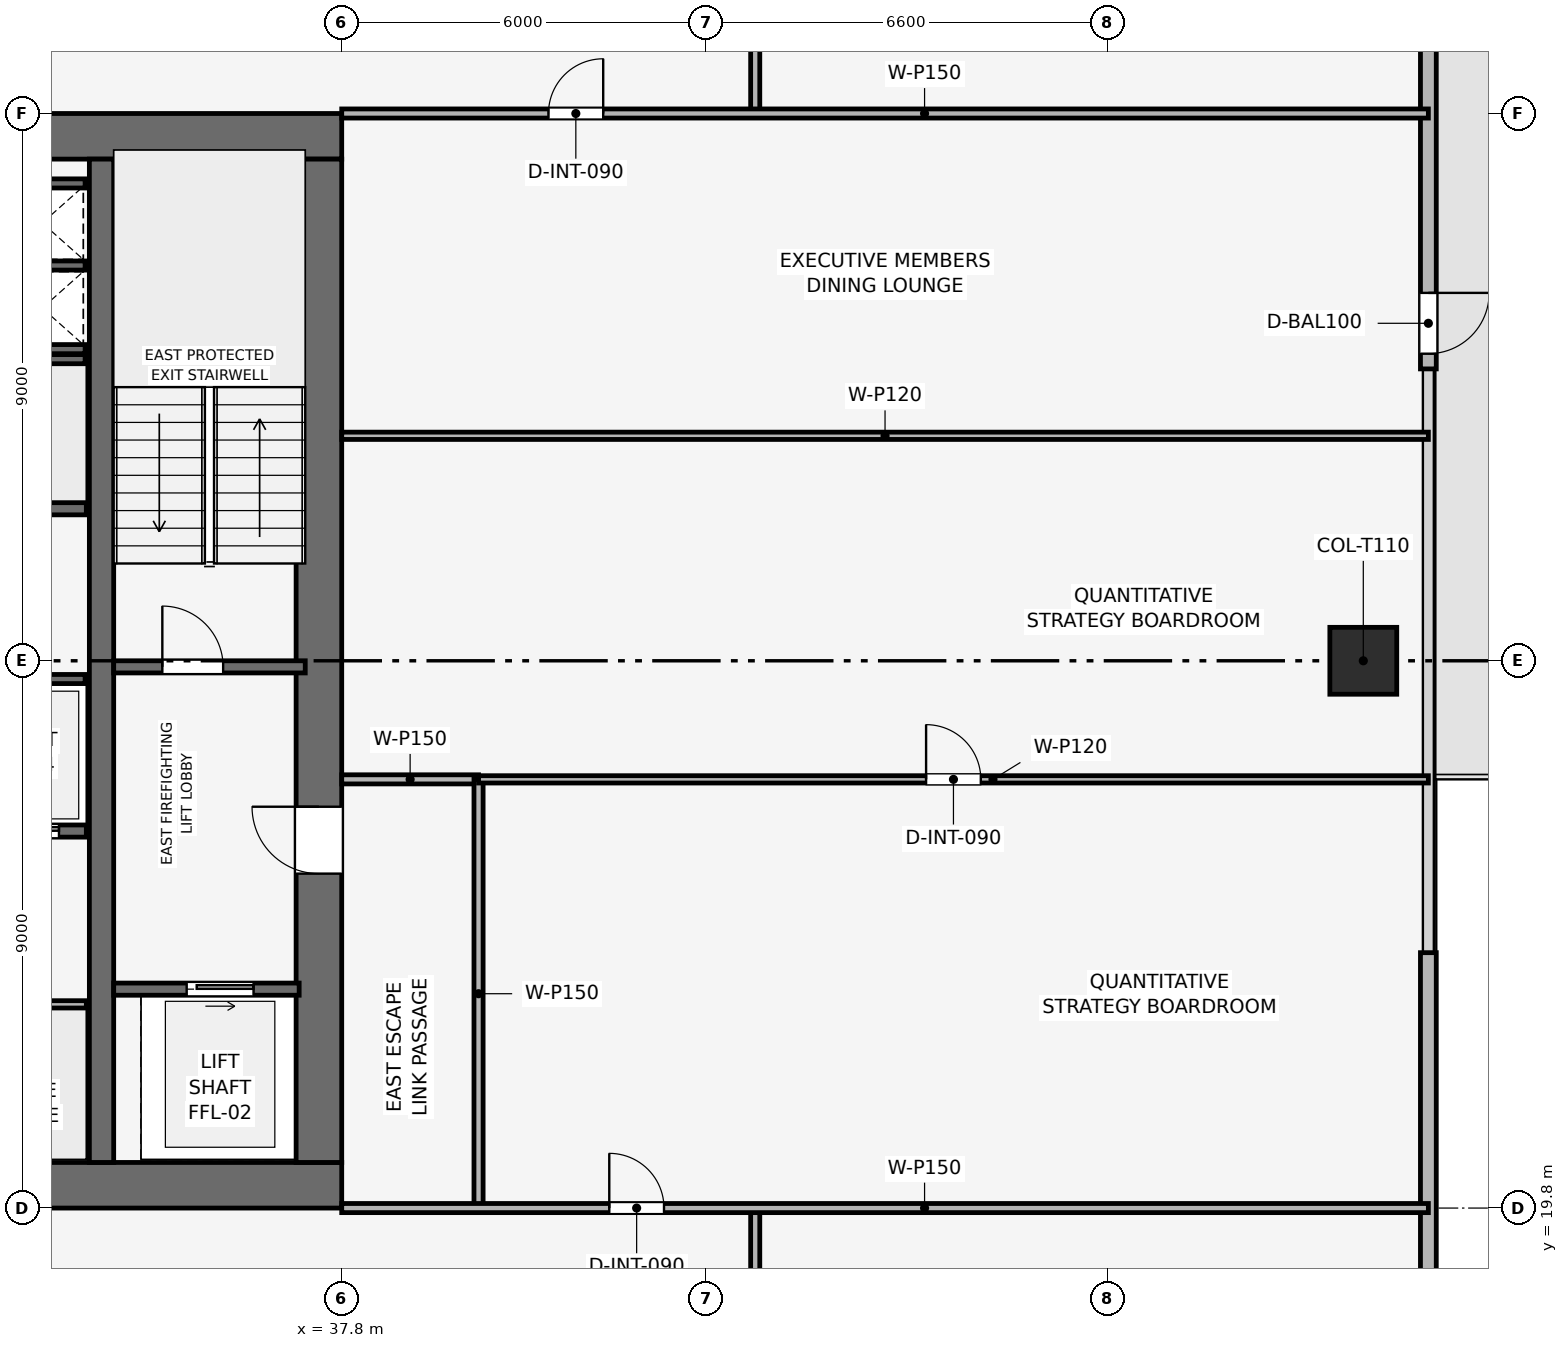
"""IFC4 building model, lengths in metres.
Left out: names, types, materials, properties, quantities, classifications, styles, units other than length and angle.
Written with IfcOpenShell. Run it as: python <this file> out.ifc"""

import sys

from ifc_helpers import new_model, si_unit, direction, frame, frame_2d, origin, origin_2d, place, context, subcontext, project, spatial, rectangle, extrude, element, fill, save


model = new_model("IFC4")
c1 = context("Model", 3, precision=1e-05, world=origin(), true_north=direction((0.0, 1.0)))
c2 = subcontext(c1, "Body", "Model", "MODEL_VIEW")
j1 = project(units=[si_unit("LENGTHUNIT", "METRE"), si_unit("PLANEANGLEUNIT", "RADIAN")], contexts=[c1])
p1 = place(None, origin())
s1 = spatial("IfcSite", under=j1, at=p1, CompositionType="ELEMENT")
p2 = place(p1, origin())
s2 = spatial("IfcBuilding", under=s1, at=p2, CompositionType="ELEMENT")
p3 = place(p2, frame((0.0, 0.0, 237.45)))
s3 = spatial("IfcBuildingStorey", under=s2, at=p3, CompositionType="ELEMENT", Elevation=237.45)
p4 = place(p3, frame((19.8, 20.175, 0.0), z_axis=(0.0, 0.0, 1.0), x_axis=(1.0, 0.0, 0.0)))
e1 = element("IfcWall", 1, at=p4, inside=s3, PredefinedType="SHEAR", context=c2, shape_type="SweptSolid", body=[
    extrude(rectangle(XDim=18.0, YDim=0.75, at=frame_2d((9.0, 0.0))), origin(), (0.0, 0.0, 1.0), 3.75),
])
p5 = place(p4, frame((8.4, 0.0, 0.0)))
e2 = element("IfcOpeningElement", 2, at=p5, cuts=e1, PredefinedType="OPENING", context=c2, shape_type="SweptSolid", body=[
    extrude(rectangle(XDim=1.2, YDim=2.2, at=frame_2d((0.6, 1.1))), frame((0.0, 0.385, 0.0), z_axis=(0.0, -1.0, 0.0), x_axis=(1.0, 0.0, 0.0)), (0.0, 0.0, 1.0), 0.77),
])
p6 = place(p3, frame((19.8, 37.425, 0.0), z_axis=(0.0, 0.0, 1.0), x_axis=(1.0, 0.0, 0.0)))
e3 = element("IfcWall", 3, at=p6, inside=s3, PredefinedType="SHEAR", context=c2, shape_type="SweptSolid", body=[
    extrude(rectangle(XDim=18.0, YDim=0.75, at=frame_2d((9.0, 0.0))), origin(), (0.0, 0.0, 1.0), 3.75),
])
p7 = place(p6, frame((7.05, 0.0, 0.0)))
e4 = element("IfcOpeningElement", 4, at=p7, cuts=e3, PredefinedType="OPENING", context=c2, shape_type="SweptSolid", body=[
    extrude(rectangle(XDim=1.1, YDim=2.15, at=frame_2d((0.55, 1.075))), frame((0.0, 0.385, 0.0), z_axis=(0.0, -1.0, 0.0), x_axis=(1.0, 0.0, 0.0)), (0.0, 0.0, 1.0), 0.77),
])
p8 = place(p3, frame((37.425, 20.55, 0.0), z_axis=(0.0, 0.0, 1.0), x_axis=(0.0, 1.0, 0.0)))
e5 = element("IfcWall", 5, at=p8, inside=s3, PredefinedType="SHEAR", context=c2, shape_type="SweptSolid", body=[
    extrude(rectangle(XDim=16.5, YDim=0.75, at=frame_2d((8.25, 0.0))), origin(), (0.0, 0.0, 1.0), 3.75),
])
p9 = place(p8, frame((4.75, 0.0, 0.0)))
e6 = element("IfcOpeningElement", 6, at=p9, cuts=e5, PredefinedType="OPENING", context=c2, shape_type="SweptSolid", body=[
    extrude(rectangle(XDim=1.1, YDim=2.15, at=frame_2d((0.55, 1.075))), frame((0.0, 0.385, 0.0), z_axis=(0.0, -1.0, 0.0), x_axis=(1.0, 0.0, 0.0)), (0.0, 0.0, 1.0), 0.77),
])
p10 = place(p3, frame((33.85, 20.55, 0.0), z_axis=(0.0, 0.0, 1.0), x_axis=(0.0, 1.0, 0.0)))
e7 = element("IfcWall", 7, at=p10, inside=s3, PredefinedType="SHEAR", context=c2, shape_type="SweptSolid", body=[
    extrude(rectangle(XDim=16.5, YDim=0.4, at=frame_2d((8.25, 0.0))), origin(), (0.0, 0.0, 1.0), 3.75),
])
p11 = place(p3, frame((54.6, 28.8, 0.003), z_axis=(0.0, 0.0, 1.0), x_axis=(1.0, 0.0, 0.0)))
e8 = element("IfcColumn", 8, at=p11, inside=s3, PredefinedType="COLUMN", context=c2, shape_type="SweptSolid", body=[
    extrude(rectangle(XDim=1.1, YDim=1.1, at=origin_2d()), origin(), (0.0, 0.0, 1.0), 3.494),
])
p12 = place(p3, frame((55.67, 48.3, 0.0), z_axis=(0.0, 0.0, 1.0), x_axis=(0.0, -1.0, 0.0)))
e9 = element("IfcWall", 9, at=p12, inside=s3, PredefinedType="SOLIDWALL", context=c2, shape_type="SweptSolid", body=[
    extrude(rectangle(XDim=14.7, YDim=0.26, at=frame_2d((7.35, 0.0))), origin(), (0.0, 0.0, 1.0), 3.5),
])
p13 = place(p12, frame((13.45, 0.0, 0.0)))
e10 = element("IfcOpeningElement", 10, at=p13, cuts=e9, PredefinedType="OPENING", context=c2, shape_type="SweptSolid", body=[
    extrude(rectangle(XDim=1.0, YDim=2.2, at=frame_2d((0.5, 1.1))), frame((0.0, 0.14, 0.0), z_axis=(0.0, -1.0, 0.0), x_axis=(1.0, 0.0, 0.0)), (0.0, 0.0, 1.0), 0.28),
])
p14 = place(p3, frame((55.67, 24.0, 0.0), z_axis=(0.0, 0.0, 1.0), x_axis=(0.0, -1.0, 0.0)))
e11 = element("IfcWall", 11, at=p14, inside=s3, PredefinedType="SOLIDWALL", context=c2, shape_type="SweptSolid", body=[
    extrude(rectangle(XDim=14.7, YDim=0.26, at=frame_2d((7.35, 0.0))), origin(), (0.0, 0.0, 1.0), 3.5),
])
p15 = place(p14, frame((12.65, 0.0, 0.72)))
e12 = element("IfcOpeningElement", 12, at=p15, cuts=e11, PredefinedType="OPENING", context=c2, shape_type="SweptSolid", body=[
    extrude(rectangle(XDim=1.8, YDim=2.1, at=frame_2d((0.9, 1.05))), frame((0.0, 0.14, 0.0), z_axis=(0.0, -1.0, 0.0), x_axis=(1.0, 0.0, 0.0)), (0.0, 0.0, 1.0), 0.28),
])
p16 = place(p3, frame((34.05, 28.7, 0.0), z_axis=(0.0, 0.0, 1.0), x_axis=(1.0, 0.0, 0.0)))
e13 = element("IfcWall", 13, at=p16, inside=s3, PredefinedType="SHEAR", context=c2, shape_type="SweptSolid", body=[
    extrude(rectangle(XDim=3.15, YDim=0.2, at=frame_2d((1.575, 0.0))), origin(), (0.0, 0.0, 1.0), 3.5),
])
p17 = place(p16, frame((0.8, 0.0, 0.0)))
e14 = element("IfcOpeningElement", 14, at=p17, cuts=e13, PredefinedType="OPENING", context=c2, shape_type="SweptSolid", body=[
    extrude(rectangle(XDim=1.0, YDim=2.1, at=frame_2d((0.5, 1.05))), frame((0.0, 0.11, 0.0), z_axis=(0.0, -1.0, 0.0), x_axis=(1.0, 0.0, 0.0)), (0.0, 0.0, 1.0), 0.22),
])
for number, where, z_axis, x_axis in (
    (15, (32.25, 33.925, 0.0), (0.0, 0.0, 1.0), (1.0, 0.0, 0.0)),
    (16, (32.25, 35.3, 0.0), (0.0, 0.0, 1.0), (1.0, 0.0, 0.0)),
):
    element("IfcWall", number, at=place(p3, frame(where, z_axis=z_axis, x_axis=x_axis)), inside=s3, PredefinedType="SHEAR", context=c2, shape_type="SweptSolid", body=[
        extrude(rectangle(XDim=1.33, YDim=0.15, at=frame_2d((0.665, 0.0))), origin(), (0.0, 0.0, 1.0), 3.5),
    ])
p18 = place(p3, frame((34.05, 23.4, 0.0), z_axis=(0.0, 0.0, 1.0), x_axis=(1.0, 0.0, 0.0)))
e17 = element("IfcWall", 17, at=p18, inside=s3, PredefinedType="SHEAR", context=c2, shape_type="SweptSolid", body=[
    extrude(rectangle(XDim=3.05, YDim=0.2, at=frame_2d((1.525, 0.0))), origin(), (0.0, 0.0, 1.0), 3.5),
])
p19 = place(p18, frame((1.2, 0.0, 0.0)))
e18 = element("IfcOpeningElement", 18, at=p19, cuts=e17, PredefinedType="OPENING", context=c2, shape_type="SweptSolid", body=[
    extrude(rectangle(XDim=1.1, YDim=2.15, at=frame_2d((0.55, 1.075))), frame((0.0, 0.11, 0.0), z_axis=(0.0, -1.0, 0.0), x_axis=(1.0, 0.0, 0.0)), (0.0, 0.0, 1.0), 0.22),
])
p20 = place(p3, frame((31.6, 26.0, 0.0), z_axis=(0.0, 0.0, 1.0), x_axis=(1.0, 0.0, 0.0)))
e19 = element("IfcWall", 19, at=p20, inside=s3, PredefinedType="SHEAR", context=c2, shape_type="SweptSolid", body=[
    extrude(rectangle(XDim=2.0, YDim=0.2, at=frame_2d((1.0, 0.0))), origin(), (0.0, 0.0, 1.0), 3.5),
])
p21 = place(p20, frame((0.45, 0.0, 0.0)))
e20 = element("IfcOpeningElement", 20, at=p21, cuts=e19, PredefinedType="OPENING", context=c2, shape_type="SweptSolid", body=[
    extrude(rectangle(XDim=1.1, YDim=2.15, at=frame_2d((0.55, 1.075))), frame((0.0, 0.11, 0.0), z_axis=(0.0, -1.0, 0.0), x_axis=(1.0, 0.0, 0.0)), (0.0, 0.0, 1.0), 0.22),
])
p22 = place(p3, frame((31.6, 31.3, 0.0), z_axis=(0.0, 0.0, 1.0), x_axis=(1.0, 0.0, 0.0)))
e21 = element("IfcWall", 21, at=p22, inside=s3, PredefinedType="SHEAR", context=c2, shape_type="SweptSolid", body=[
    extrude(rectangle(XDim=2.0, YDim=0.2, at=frame_2d((1.0, 0.0))), origin(), (0.0, 0.0, 1.0), 3.5),
])
p23 = place(p3, frame((32.25, 36.65, 0.0), z_axis=(0.0, 0.0, 1.0), x_axis=(1.0, 0.0, 0.0)))
e22 = element("IfcWall", 22, at=p23, inside=s3, PredefinedType="SHEAR", context=c2, shape_type="SweptSolid", body=[
    extrude(rectangle(XDim=1.33, YDim=0.15, at=frame_2d((0.665, 0.0))), origin(), (0.0, 0.0, 1.0), 3.5),
])
for number, where, z_axis, x_axis in (
    (23, (29.5, 28.5, 0.0), (0.0, 0.0, 1.0), (1.0, 0.0, 0.0)),
    (24, (29.5, 33.76, 0.0), (0.0, 0.0, 1.0), (1.0, 0.0, 0.0)),
):
    element("IfcWall", number, at=place(p3, frame(where, z_axis=z_axis, x_axis=x_axis)), inside=s3, PredefinedType="SHEAR", context=c2, shape_type="SweptSolid", body=[
        extrude(rectangle(XDim=4.08, YDim=0.15, at=frame_2d((2.04, 0.0))), origin(), (0.0, 0.0, 1.0), 3.5),
    ])
p24 = place(p3, frame((29.55, 23.15, 0.0), z_axis=(0.0, 0.0, 1.0), x_axis=(1.0, 0.0, 0.0)))
e25 = element("IfcWall", 25, at=p24, inside=s3, PredefinedType="PARTITIONING", context=c2, shape_type="SweptSolid", body=[
    extrude(rectangle(XDim=4.05, YDim=0.12, at=frame_2d((2.025, 0.0))), origin(), (0.0, 0.0, 1.0), 3.5),
])
p25 = place(p24, frame((1.575, 0.0, 0.0)))
e26 = element("IfcOpeningElement", 26, at=p25, cuts=e25, PredefinedType="OPENING", context=c2, shape_type="SweptSolid", body=[
    extrude(rectangle(XDim=0.9, YDim=2.1, at=frame_2d((0.45, 1.05))), frame((0.0, 0.07, 0.0), z_axis=(0.0, -1.0, 0.0), x_axis=(1.0, 0.0, 0.0)), (0.0, 0.0, 1.0), 0.14),
])
p26 = place(p3, frame((37.8, 26.85, 0.0), z_axis=(0.0, 0.0, 1.0), x_axis=(1.0, 0.0, 0.0)))
e27 = element("IfcWall", 27, at=p26, inside=s3, PredefinedType="PARTITIONING", context=c2, shape_type="SweptSolid", body=[
    extrude(rectangle(XDim=2.25, YDim=0.15, at=frame_2d((1.125, 0.0))), origin(), (0.0, 0.0, 1.0), 3.5),
])
p27 = place(p3, frame((40.05, 19.8, 0.0), z_axis=(0.0, 0.0, 1.0), x_axis=(0.0, 1.0, 0.0)))
e28 = element("IfcWall", 28, at=p27, inside=s3, PredefinedType="PARTITIONING", context=c2, shape_type="SweptSolid", body=[
    extrude(rectangle(XDim=7.05, YDim=0.15, at=frame_2d((3.525, 0.0))), origin(), (0.0, 0.0, 1.0), 3.035),
])
p28 = place(p3, frame((40.05, 26.85, 0.0), z_axis=(0.0, 0.0, 1.0), x_axis=(1.0, 0.0, 0.0)))
e29 = element("IfcWall", 29, at=p28, inside=s3, PredefinedType="PARTITIONING", context=c2, shape_type="SweptSolid", body=[
    extrude(rectangle(XDim=15.62, YDim=0.12, at=frame_2d((7.81, 0.0))), origin(), (0.0, 0.0, 1.0), 2.685),
])
p29 = place(p28, frame((7.36, 0.0, 0.0)))
e30 = element("IfcOpeningElement", 30, at=p29, cuts=e29, PredefinedType="OPENING", context=c2, shape_type="SweptSolid", body=[
    extrude(rectangle(XDim=0.9, YDim=2.1, at=frame_2d((0.45, 1.05))), frame((0.0, 0.07, 0.0), z_axis=(0.0, -1.0, 0.0), x_axis=(1.0, 0.0, 0.0)), (0.0, 0.0, 1.0), 0.14),
])
p30 = place(p3, frame((37.8, 32.5, 0.0), z_axis=(0.0, 0.0, 1.0), x_axis=(1.0, 0.0, 0.0)))
e31 = element("IfcWall", 31, at=p30, inside=s3, PredefinedType="PARTITIONING", context=c2, shape_type="SweptSolid", body=[
    extrude(rectangle(XDim=17.87, YDim=0.12, at=frame_2d((8.935, 0.0))), origin(), (0.0, 0.0, 1.0), 2.685),
])
p31 = place(p3, frame((44.6, 17.4, 0.0), z_axis=(0.0, 0.0, 1.0), x_axis=(0.0, 1.0, 0.0)))
e32 = element("IfcWall", 32, at=p31, inside=s3, PredefinedType="PARTITIONING", context=c2, shape_type="SweptSolid", body=[
    extrude(rectangle(XDim=2.4, YDim=0.15, at=frame_2d((1.2, 0.0))), origin(), (0.0, 0.0, 1.0), 3.5),
])
p32 = place(p3, frame((44.6, 37.8, 0.0), z_axis=(0.0, 0.0, 1.0), x_axis=(0.0, 1.0, 0.0)))
e33 = element("IfcWall", 33, at=p32, inside=s3, PredefinedType="PARTITIONING", context=c2, shape_type="SweptSolid", body=[
    extrude(rectangle(XDim=2.4, YDim=0.15, at=frame_2d((1.2, 0.0))), origin(), (0.0, 0.0, 1.0), 3.5),
])
p33 = place(p3, frame((37.8, 19.8, 0.0), z_axis=(0.0, 0.0, 1.0), x_axis=(1.0, 0.0, 0.0)))
e34 = element("IfcWall", 34, at=p33, inside=s3, PredefinedType="PARTITIONING", context=c2, shape_type="SweptSolid", body=[
    extrude(rectangle(XDim=17.87, YDim=0.15, at=frame_2d((8.935, 0.0))), origin(), (0.0, 0.0, 1.0), 2.685),
])
p34 = place(p33, frame((4.4, 0.0, 0.0)))
e35 = element("IfcOpeningElement", 35, at=p34, cuts=e34, PredefinedType="OPENING", context=c2, shape_type="SweptSolid", body=[
    extrude(rectangle(XDim=0.9, YDim=2.1, at=frame_2d((0.45, 1.05))), frame((0.0, 0.085, 0.0), z_axis=(0.0, -1.0, 0.0), x_axis=(1.0, 0.0, 0.0)), (0.0, 0.0, 1.0), 0.17),
])
p35 = place(p3, frame((37.8, 37.8, 0.0), z_axis=(0.0, 0.0, 1.0), x_axis=(1.0, 0.0, 0.0)))
e36 = element("IfcWall", 36, at=p35, inside=s3, PredefinedType="PARTITIONING", context=c2, shape_type="SweptSolid", body=[
    extrude(rectangle(XDim=17.87, YDim=0.15, at=frame_2d((8.935, 0.0))), origin(), (0.0, 0.0, 1.0), 2.685),
])
p36 = place(p35, frame((3.4, 0.0, 0.0)))
e37 = element("IfcOpeningElement", 37, at=p36, cuts=e36, PredefinedType="OPENING", context=c2, shape_type="SweptSolid", body=[
    extrude(rectangle(XDim=0.9, YDim=2.1, at=frame_2d((0.45, 1.05))), frame((0.0, 0.085, 0.0), z_axis=(0.0, -1.0, 0.0), x_axis=(1.0, 0.0, 0.0)), (0.0, 0.0, 1.0), 0.17),
])
p37 = place(p13, origin())
e38 = element("IfcDoor", 38, at=p37, inside=s3, OperationType="SINGLE_SWING_LEFT", PredefinedType="DOOR", context=c2, shape_type="SweptSolid", body=[
    extrude(rectangle(XDim=1.0, YDim=2.2, at=frame_2d((0.5, 1.1))), frame((0.0, 0.025, 0.0), z_axis=(0.0, -1.0, 0.0), x_axis=(1.0, 0.0, 0.0)), (0.0, 0.0, 1.0), 0.05),
])
fill(e10, e38)
p38 = place(p17, origin())
e39 = element("IfcDoor", 39, at=p38, inside=s3, OperationType="SINGLE_SWING_LEFT", PredefinedType="DOOR", context=c2, shape_type="SweptSolid", body=[
    extrude(rectangle(XDim=1.0, YDim=2.1, at=frame_2d((0.5, 1.05))), frame((0.0, 0.025, 0.0), z_axis=(0.0, -1.0, 0.0), x_axis=(1.0, 0.0, 0.0)), (0.0, 0.0, 1.0), 0.05),
])
fill(e14, e39)
p39 = place(p19, origin())
e40 = element("IfcDoor", 40, at=p39, inside=s3, OperationType="SLIDING_TO_RIGHT", PredefinedType="DOOR", context=c2, shape_type="SweptSolid", body=[
    extrude(rectangle(XDim=1.1, YDim=2.15, at=frame_2d((0.55, 1.075))), frame((0.0, 0.025, 0.0), z_axis=(0.0, -1.0, 0.0), x_axis=(1.0, 0.0, 0.0)), (0.0, 0.0, 1.0), 0.05),
])
fill(e18, e40)
p40 = place(p21, origin())
e41 = element("IfcDoor", 41, at=p40, inside=s3, OperationType="SLIDING_TO_RIGHT", PredefinedType="DOOR", context=c2, shape_type="SweptSolid", body=[
    extrude(rectangle(XDim=1.1, YDim=2.15, at=frame_2d((0.55, 1.075))), frame((0.0, 0.025, 0.0), z_axis=(0.0, -1.0, 0.0), x_axis=(1.0, 0.0, 0.0)), (0.0, 0.0, 1.0), 0.05),
])
fill(e20, e41)
p41 = place(p29, origin())
e42 = element("IfcDoor", 42, at=p41, inside=s3, OperationType="SINGLE_SWING_LEFT", PredefinedType="DOOR", context=c2, shape_type="SweptSolid", body=[
    extrude(rectangle(XDim=0.9, YDim=2.1, at=frame_2d((0.45, 1.05))), frame((0.0, 0.025, 0.0), z_axis=(0.0, -1.0, 0.0), x_axis=(1.0, 0.0, 0.0)), (0.0, 0.0, 1.0), 0.05),
])
fill(e30, e42)
p42 = place(p34, origin())
e43 = element("IfcDoor", 43, at=p42, inside=s3, OperationType="SINGLE_SWING_LEFT", PredefinedType="DOOR", context=c2, shape_type="SweptSolid", body=[
    extrude(rectangle(XDim=0.9, YDim=2.1, at=frame_2d((0.45, 1.05))), frame((0.0, 0.025, 0.0), z_axis=(0.0, -1.0, 0.0), x_axis=(1.0, 0.0, 0.0)), (0.0, 0.0, 1.0), 0.05),
])
fill(e35, e43)
p43 = place(p36, origin())
e44 = element("IfcDoor", 44, at=p43, inside=s3, OperationType="SINGLE_SWING_RIGHT", PredefinedType="DOOR", context=c2, shape_type="SweptSolid", body=[
    extrude(rectangle(XDim=0.9, YDim=2.1, at=frame_2d((0.45, 1.05))), frame((0.0, 0.025, 0.0), z_axis=(0.0, -1.0, 0.0), x_axis=(1.0, 0.0, 0.0)), (0.0, 0.0, 1.0), 0.05),
])
fill(e37, e44)
p44 = place(p9, origin())
e45 = element("IfcDoor", 45, at=p44, inside=s3, OperationType="SINGLE_SWING_RIGHT", PredefinedType="DOOR", context=c2, shape_type="SweptSolid", body=[
    extrude(rectangle(XDim=1.1, YDim=2.15, at=frame_2d((0.55, 1.075))), frame((0.0, 0.025, 0.0), z_axis=(0.0, -1.0, 0.0), x_axis=(1.0, 0.0, 0.0)), (0.0, 0.0, 1.0), 0.05),
])
fill(e6, e45)
save(model, sys.argv[1])
